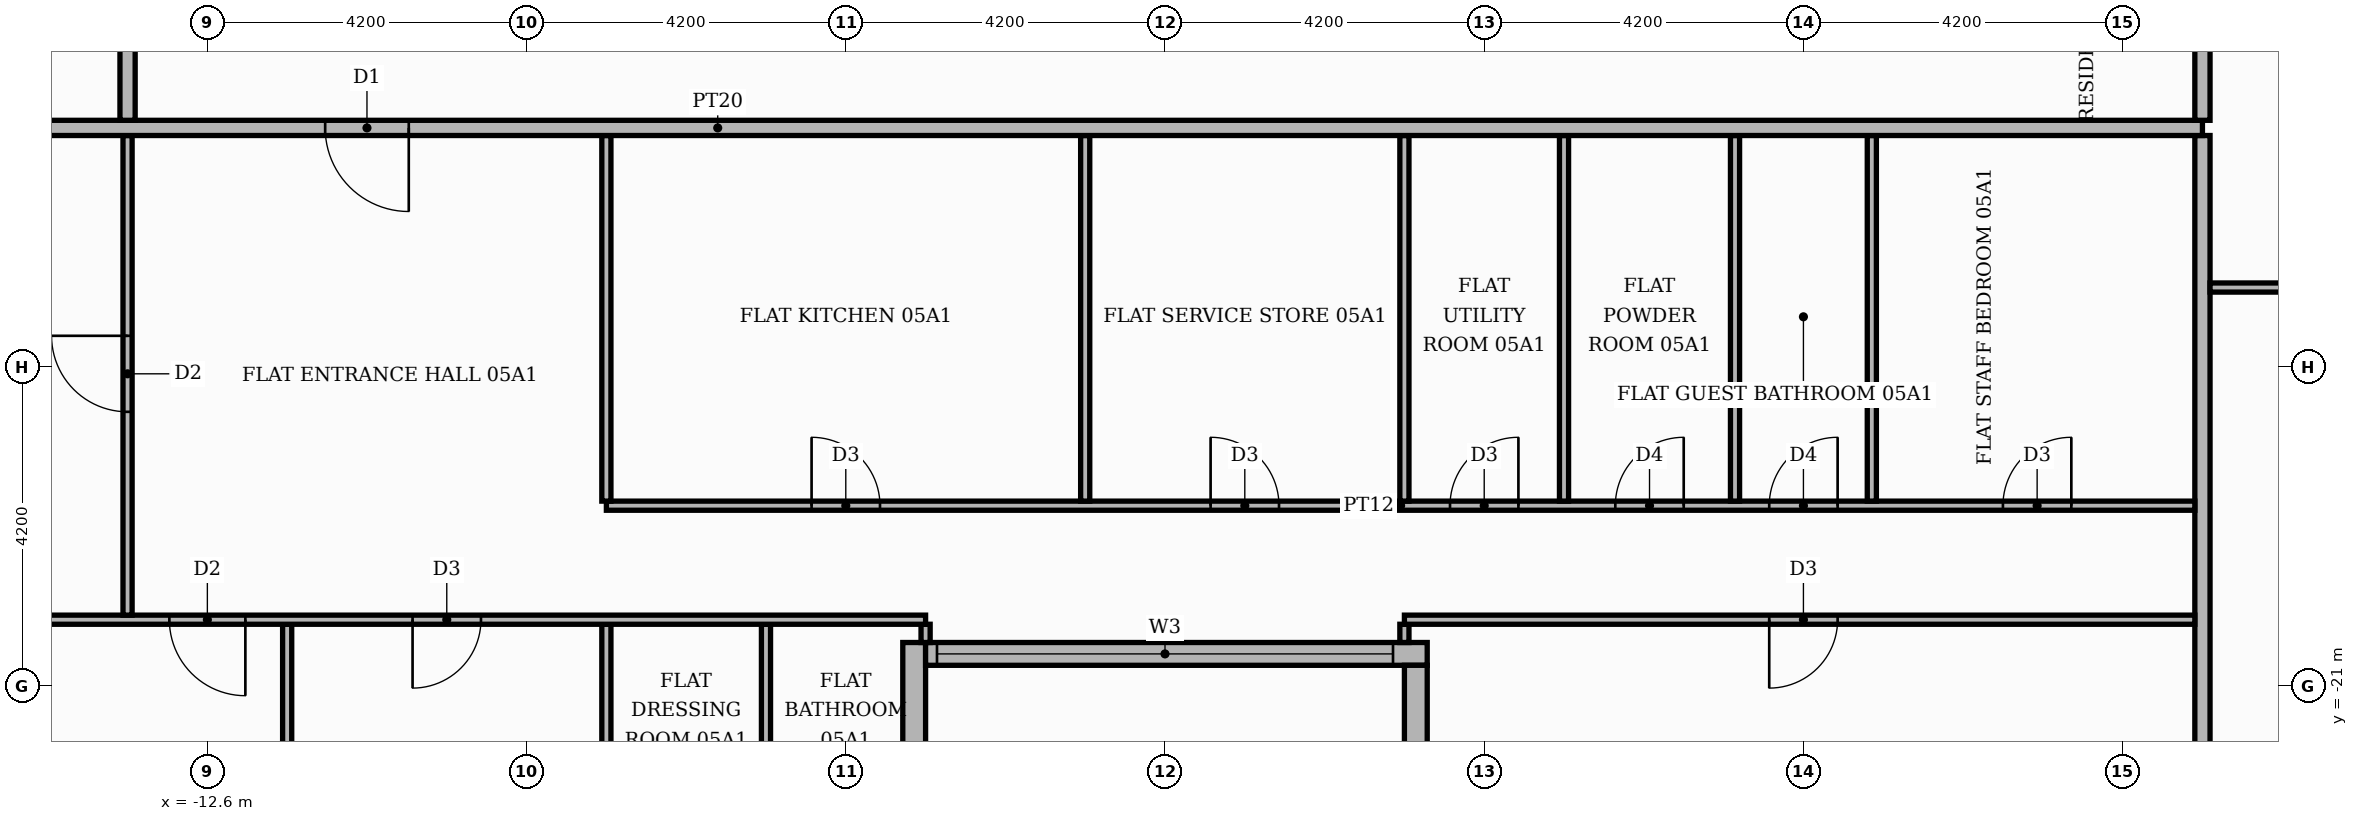
"""IFC4 building model, lengths in metres.
Left out: names, types, materials, properties, quantities, classifications, styles, units other than length and angle.
Written with IfcOpenShell. Run it as: python <this file> out.ifc"""

import sys

from ifc_helpers import new_model, si_unit, direction, frame, frame_2d, origin, place, context, subcontext, project, spatial, rectangle, extrude, element, fill, save


model = new_model("IFC4")
c1 = context("Model", 3, precision=1e-05, world=origin(), true_north=direction((0.0, 1.0)))
c2 = subcontext(c1, "Body", "Model", "MODEL_VIEW")
j1 = project(units=[si_unit("LENGTHUNIT", "METRE"), si_unit("PLANEANGLEUNIT", "RADIAN")], contexts=[c1])
p1 = place(None, origin())
s1 = spatial("IfcSite", under=j1, at=p1, CompositionType="ELEMENT")
p2 = place(p1, origin())
s2 = spatial("IfcBuilding", under=s1, at=p2, CompositionType="ELEMENT")
p3 = place(p2, frame((0.0, 0.0, 27.0)))
s3 = spatial("IfcBuildingStorey", under=s2, at=p3, CompositionType="ELEMENT", Elevation=27.0)
p4 = place(p3, frame((-3.3, -25.42, 0.0), z_axis=(0.0, 0.0, 1.0), x_axis=(0.0, 1.0, 0.0)))
e1 = element("IfcWall", 1, at=p4, inside=s3, PredefinedType="STANDARD", context=c2, shape_type="SweptSolid", body=[
    extrude(rectangle(XDim=5.0, YDim=0.3, at=frame_2d((2.5, 0.0))), origin(), (0.0, 0.0, 1.0), 3.48),
])
p5 = place(p4, frame((1.42, 0.0, 0.9)))
e2 = element("IfcOpeningElement", 2, at=p5, cuts=e1, PredefinedType="OPENING", context=c2, shape_type="SweptSolid", body=[
    extrude(rectangle(XDim=1.8, YDim=2.1, at=frame_2d((0.9, 1.05))), frame((0.0, 0.16, 0.0), z_axis=(0.0, -1.0, 0.0), x_axis=(1.0, 0.0, 0.0)), (0.0, 0.0, 1.0), 0.32),
])
p6 = place(p3, frame((-3.15, -20.57, 0.0), z_axis=(0.0, 0.0, 1.0), x_axis=(1.0, 0.0, 0.0)))
e3 = element("IfcWall", 3, at=p6, inside=s3, PredefinedType="STANDARD", context=c2, shape_type="SweptSolid", body=[
    extrude(rectangle(XDim=6.6, YDim=0.3, at=frame_2d((3.3, 0.0))), origin(), (0.0, 0.0, 1.0), 3.48),
])
p7 = place(p6, frame((0.15, 0.0, 0.9)))
e4 = element("IfcOpeningElement", 4, at=p7, cuts=e3, PredefinedType="OPENING", context=c2, shape_type="SweptSolid", body=[
    extrude(rectangle(XDim=6.0, YDim=2.1, at=frame_2d((3.0, 1.05))), frame((0.0, 0.16, 0.0), z_axis=(0.0, -1.0, 0.0), x_axis=(1.0, 0.0, 0.0)), (0.0, 0.0, 1.0), 0.32),
])
p8 = place(p3, frame((3.3, -20.72, 0.0), z_axis=(0.0, 0.0, 1.0), x_axis=(0.0, -1.0, 0.0)))
e5 = element("IfcWall", 5, at=p8, inside=s3, PredefinedType="STANDARD", context=c2, shape_type="SweptSolid", body=[
    extrude(rectangle(XDim=5.0, YDim=0.3, at=frame_2d((2.5, 0.0))), origin(), (0.0, 0.0, 1.0), 3.48),
])
p9 = place(p8, frame((1.48, 0.0, 0.9)))
e6 = element("IfcOpeningElement", 6, at=p9, cuts=e5, PredefinedType="OPENING", context=c2, shape_type="SweptSolid", body=[
    extrude(rectangle(XDim=1.8, YDim=2.1, at=frame_2d((0.9, 1.05))), frame((0.0, 0.16, 0.0), z_axis=(0.0, -1.0, 0.0), x_axis=(1.0, 0.0, 0.0)), (0.0, 0.0, 1.0), 0.32),
])
p10 = place(p3, frame((-11.55, -25.42, 0.0), z_axis=(0.0, 0.0, 1.0), x_axis=(0.0, 1.0, 0.0)))
e7 = element("IfcWall", 7, at=p10, inside=s3, PredefinedType="PARTITIONING", context=c2, shape_type="SweptSolid", body=[
    extrude(rectangle(XDim=5.24, YDim=0.12, at=frame_2d((2.62, 0.0))), origin(), (0.0, 0.0, 1.0), 3.48),
])
p11 = place(p3, frame((-7.35, -25.42, 0.0), z_axis=(0.0, 0.0, 1.0), x_axis=(0.0, 1.0, 0.0)))
e8 = element("IfcWall", 8, at=p11, inside=s3, PredefinedType="PARTITIONING", context=c2, shape_type="SweptSolid", body=[
    extrude(rectangle(XDim=5.24, YDim=0.12, at=frame_2d((2.62, 0.0))), origin(), (0.0, 0.0, 1.0), 3.48),
])
p12 = place(p11, frame((2.05, 0.0, 0.0)))
e9 = element("IfcOpeningElement", 9, at=p12, cuts=e8, PredefinedType="OPENING", context=c2, shape_type="SweptSolid", body=[
    extrude(rectangle(XDim=0.9, YDim=2.1, at=frame_2d((0.45, 1.05))), frame((0.0, 0.07, 0.0), z_axis=(0.0, -1.0, 0.0), x_axis=(1.0, 0.0, 0.0)), (0.0, 0.0, 1.0), 0.14),
])
p13 = place(p3, frame((-5.25, -25.42, 0.0), z_axis=(0.0, 0.0, 1.0), x_axis=(0.0, 1.0, 0.0)))
e10 = element("IfcWall", 10, at=p13, inside=s3, PredefinedType="PARTITIONING", context=c2, shape_type="SweptSolid", body=[
    extrude(rectangle(XDim=5.24, YDim=0.12, at=frame_2d((2.62, 0.0))), origin(), (0.0, 0.0, 1.0), 3.48),
])
p14 = place(p13, frame((2.05, 0.0, 0.0)))
e11 = element("IfcOpeningElement", 11, at=p14, cuts=e10, PredefinedType="OPENING", context=c2, shape_type="SweptSolid", body=[
    extrude(rectangle(XDim=0.9, YDim=2.1, at=frame_2d((0.45, 1.05))), frame((0.0, 0.07, 0.0), z_axis=(0.0, -1.0, 0.0), x_axis=(1.0, 0.0, 0.0)), (0.0, 0.0, 1.0), 0.14),
])
p15 = place(p3, frame((13.65, -25.42, 0.0), z_axis=(0.0, 0.0, 1.0), x_axis=(0.0, 1.0, 0.0)))
e12 = element("IfcWall", 12, at=p15, inside=s3, PredefinedType="PARTITIONING", context=c2, shape_type="SweptSolid", body=[
    extrude(rectangle(XDim=11.67, YDim=0.2, at=frame_2d((5.835, 0.0))), origin(), (0.0, 0.0, 1.0), 3.48),
])
for number, where, z_axis, x_axis in (
    (13, (-3.15, -20.42, 0.0), (0.0, 0.0, 1.0), (0.0, 1.0, 0.0)),
    (14, (3.15, -20.42, 0.0), (0.0, 0.0, 1.0), (0.0, 1.0, 0.0)),
):
    element("IfcWall", number, at=place(p3, frame(where, z_axis=z_axis, x_axis=x_axis)), inside=s3, PredefinedType="PARTITIONING", context=c2, shape_type="SweptSolid", body=[
        extrude(rectangle(XDim=0.24, YDim=0.12, at=frame_2d((0.12, 0.0))), origin(), (0.0, 0.0, 1.0), 3.48),
    ])
p16 = place(p3, frame((-17.3, -20.12, 0.0), z_axis=(0.0, 0.0, 1.0), x_axis=(1.0, 0.0, 0.0)))
e15 = element("IfcWall", 15, at=p16, inside=s3, PredefinedType="PARTITIONING", context=c2, shape_type="SweptSolid", body=[
    extrude(rectangle(XDim=14.15, YDim=0.12, at=frame_2d((7.075, 0.0))), origin(), (0.0, 0.0, 1.0), 3.48),
])
p17 = place(p16, frame((4.2, 0.0, 0.0)))
e16 = element("IfcOpeningElement", 16, at=p17, cuts=e15, PredefinedType="OPENING", context=c2, shape_type="SweptSolid", body=[
    extrude(rectangle(XDim=1.0, YDim=2.1, at=frame_2d((0.5, 1.05))), frame((0.0, 0.07, 0.0), z_axis=(0.0, -1.0, 0.0), x_axis=(1.0, 0.0, 0.0)), (0.0, 0.0, 1.0), 0.14),
])
p18 = place(p16, frame((7.4, 0.0, 0.0)))
e17 = element("IfcOpeningElement", 17, at=p18, cuts=e15, PredefinedType="OPENING", context=c2, shape_type="SweptSolid", body=[
    extrude(rectangle(XDim=0.9, YDim=2.1, at=frame_2d((0.45, 1.05))), frame((0.0, 0.07, 0.0), z_axis=(0.0, -1.0, 0.0), x_axis=(1.0, 0.0, 0.0)), (0.0, 0.0, 1.0), 0.14),
])
p19 = place(p3, frame((3.15, -20.12, 0.0), z_axis=(0.0, 0.0, 1.0), x_axis=(1.0, 0.0, 0.0)))
e18 = element("IfcWall", 18, at=p19, inside=s3, PredefinedType="PARTITIONING", context=c2, shape_type="SweptSolid", body=[
    extrude(rectangle(XDim=10.4, YDim=0.12, at=frame_2d((5.2, 0.0))), origin(), (0.0, 0.0, 1.0), 3.48),
])
p20 = place(p19, frame((4.8, 0.0, 0.0)))
e19 = element("IfcOpeningElement", 19, at=p20, cuts=e18, PredefinedType="OPENING", context=c2, shape_type="SweptSolid", body=[
    extrude(rectangle(XDim=0.9, YDim=2.1, at=frame_2d((0.45, 1.05))), frame((0.0, 0.07, 0.0), z_axis=(0.0, -1.0, 0.0), x_axis=(1.0, 0.0, 0.0)), (0.0, 0.0, 1.0), 0.14),
])
p21 = place(p3, frame((-13.65, -20.06, 0.0), z_axis=(0.0, 0.0, 1.0), x_axis=(0.0, 1.0, 0.0)))
e20 = element("IfcWall", 20, at=p21, inside=s3, PredefinedType="PARTITIONING", context=c2, shape_type="SweptSolid", body=[
    extrude(rectangle(XDim=6.31, YDim=0.12, at=frame_2d((3.155, 0.0))), origin(), (0.0, 0.0, 1.0), 3.48),
])
p22 = place(p21, frame((2.675, 0.0, 0.0)))
e21 = element("IfcOpeningElement", 21, at=p22, cuts=e20, PredefinedType="OPENING", context=c2, shape_type="SweptSolid", body=[
    extrude(rectangle(XDim=1.0, YDim=2.1, at=frame_2d((0.5, 1.05))), frame((0.0, 0.07, 0.0), z_axis=(0.0, -1.0, 0.0), x_axis=(1.0, 0.0, 0.0)), (0.0, 0.0, 1.0), 0.14),
])
p23 = place(p3, frame((-7.35, -18.62, 0.0), z_axis=(0.0, 0.0, 1.0), x_axis=(1.0, 0.0, 0.0)))
e22 = element("IfcWall", 22, at=p23, inside=s3, PredefinedType="PARTITIONING", context=c2, shape_type="SweptSolid", body=[
    extrude(rectangle(XDim=20.9, YDim=0.12, at=frame_2d((10.45, 0.0))), origin(), (0.0, 0.0, 1.0), 3.48),
])
p24 = place(p23, frame((2.7, 0.0, 0.0)))
e23 = element("IfcOpeningElement", 23, at=p24, cuts=e22, PredefinedType="OPENING", context=c2, shape_type="SweptSolid", body=[
    extrude(rectangle(XDim=0.9, YDim=2.1, at=frame_2d((0.45, 1.05))), frame((0.0, 0.07, 0.0), z_axis=(0.0, -1.0, 0.0), x_axis=(1.0, 0.0, 0.0)), (0.0, 0.0, 1.0), 0.14),
])
p25 = place(p23, frame((7.95, 0.0, 0.0)))
e24 = element("IfcOpeningElement", 24, at=p25, cuts=e22, PredefinedType="OPENING", context=c2, shape_type="SweptSolid", body=[
    extrude(rectangle(XDim=0.9, YDim=2.1, at=frame_2d((0.45, 1.05))), frame((0.0, 0.07, 0.0), z_axis=(0.0, -1.0, 0.0), x_axis=(1.0, 0.0, 0.0)), (0.0, 0.0, 1.0), 0.14),
])
p26 = place(p23, frame((11.1, 0.0, 0.0)))
e25 = element("IfcOpeningElement", 25, at=p26, cuts=e22, PredefinedType="OPENING", context=c2, shape_type="SweptSolid", body=[
    extrude(rectangle(XDim=0.9, YDim=2.1, at=frame_2d((0.45, 1.05))), frame((0.0, 0.07, 0.0), z_axis=(0.0, -1.0, 0.0), x_axis=(1.0, 0.0, 0.0)), (0.0, 0.0, 1.0), 0.14),
])
p27 = place(p23, frame((13.275, 0.0, 0.0)))
e26 = element("IfcOpeningElement", 26, at=p27, cuts=e22, PredefinedType="OPENING", context=c2, shape_type="SweptSolid", body=[
    extrude(rectangle(XDim=0.9, YDim=2.1, at=frame_2d((0.45, 1.05))), frame((0.0, 0.07, 0.0), z_axis=(0.0, -1.0, 0.0), x_axis=(1.0, 0.0, 0.0)), (0.0, 0.0, 1.0), 0.14),
])
p28 = place(p23, frame((15.3, 0.0, 0.0)))
e27 = element("IfcOpeningElement", 27, at=p28, cuts=e22, PredefinedType="OPENING", context=c2, shape_type="SweptSolid", body=[
    extrude(rectangle(XDim=0.9, YDim=2.1, at=frame_2d((0.45, 1.05))), frame((0.0, 0.07, 0.0), z_axis=(0.0, -1.0, 0.0), x_axis=(1.0, 0.0, 0.0)), (0.0, 0.0, 1.0), 0.14),
])
p29 = place(p23, frame((18.375, 0.0, 0.0)))
e28 = element("IfcOpeningElement", 28, at=p29, cuts=e22, PredefinedType="OPENING", context=c2, shape_type="SweptSolid", body=[
    extrude(rectangle(XDim=0.9, YDim=2.1, at=frame_2d((0.45, 1.05))), frame((0.0, 0.07, 0.0), z_axis=(0.0, -1.0, 0.0), x_axis=(1.0, 0.0, 0.0)), (0.0, 0.0, 1.0), 0.14),
])
for number, where, z_axis, x_axis in (
    (29, (-7.35, -18.56, 0.0), (0.0, 0.0, 1.0), (0.0, 1.0, 0.0)),
    (30, (-1.05, -18.56, 0.0), (0.0, 0.0, 1.0), (0.0, 1.0, 0.0)),
    (31, (3.15, -18.56, 0.0), (0.0, 0.0, 1.0), (0.0, 1.0, 0.0)),
    (32, (5.25, -18.56, 0.0), (0.0, 0.0, 1.0), (0.0, 1.0, 0.0)),
    (33, (7.5, -18.56, 0.0), (0.0, 0.0, 1.0), (0.0, 1.0, 0.0)),
    (34, (9.3, -18.56, 0.0), (0.0, 0.0, 1.0), (0.0, 1.0, 0.0)),
):
    element("IfcWall", number, at=place(p3, frame(where, z_axis=z_axis, x_axis=x_axis)), inside=s3, PredefinedType="PARTITIONING", context=c2, shape_type="SweptSolid", body=[
        extrude(rectangle(XDim=4.81, YDim=0.12, at=frame_2d((2.405, 0.0))), origin(), (0.0, 0.0, 1.0), 3.48),
    ])
p30 = place(p3, frame((13.75, -15.75, 0.0), z_axis=(0.0, 0.0, 1.0), x_axis=(1.0, 0.0, 0.0)))
e35 = element("IfcWall", 35, at=p30, inside=s3, PredefinedType="PARTITIONING", context=c2, shape_type="SweptSolid", body=[
    extrude(rectangle(XDim=6.37, YDim=0.12, at=frame_2d((3.185, 0.0))), origin(), (0.0, 0.0, 1.0), 3.48),
])
p31 = place(p30, frame((2.635, 0.0, 0.0)))
e36 = element("IfcOpeningElement", 36, at=p31, cuts=e35, PredefinedType="OPENING", context=c2, shape_type="SweptSolid", body=[
    extrude(rectangle(XDim=1.0, YDim=2.1, at=frame_2d((0.5, 1.05))), frame((0.0, 0.07, 0.0), z_axis=(0.0, -1.0, 0.0), x_axis=(1.0, 0.0, 0.0)), (0.0, 0.0, 1.0), 0.14),
])
p32 = place(p3, frame((-25.42, -13.65, 0.0), z_axis=(0.0, 0.0, 1.0), x_axis=(1.0, 0.0, 0.0)))
e37 = element("IfcWall", 37, at=p32, inside=s3, PredefinedType="PARTITIONING", context=c2, shape_type="SweptSolid", body=[
    extrude(rectangle(XDim=39.07, YDim=0.2, at=frame_2d((19.535, 0.0))), origin(), (0.0, 0.0, 1.0), 3.48),
])
p33 = place(p32, frame((14.37, 0.0, 0.0)))
e38 = element("IfcOpeningElement", 38, at=p33, cuts=e37, PredefinedType="OPENING", context=c2, shape_type="SweptSolid", body=[
    extrude(rectangle(XDim=1.1, YDim=2.4, at=frame_2d((0.55, 1.2))), frame((0.0, 0.11, 0.0), z_axis=(0.0, -1.0, 0.0), x_axis=(1.0, 0.0, 0.0)), (0.0, 0.0, 1.0), 0.22),
])
p34 = place(p3, frame((-13.65, -13.55, 0.0), z_axis=(0.0, 0.0, 1.0), x_axis=(0.0, 1.0, 0.0)))
e39 = element("IfcWall", 39, at=p34, inside=s3, PredefinedType="PARTITIONING", context=c2, shape_type="SweptSolid", body=[
    extrude(rectangle(XDim=27.1, YDim=0.2, at=frame_2d((13.55, 0.0))), origin(), (0.0, 0.0, 1.0), 3.48),
])
p35 = place(p34, frame((24.55, 0.0, 0.0)))
e40 = element("IfcOpeningElement", 40, at=p35, cuts=e39, PredefinedType="OPENING", context=c2, shape_type="SweptSolid", body=[
    extrude(rectangle(XDim=1.1, YDim=2.4, at=frame_2d((0.55, 1.2))), frame((0.0, 0.11, 0.0), z_axis=(0.0, -1.0, 0.0), x_axis=(1.0, 0.0, 0.0)), (0.0, 0.0, 1.0), 0.22),
])
p36 = place(p3, frame((13.65, -13.55, 0.0), z_axis=(0.0, 0.0, 1.0), x_axis=(0.0, 1.0, 0.0)))
e41 = element("IfcWall", 41, at=p36, inside=s3, PredefinedType="PARTITIONING", context=c2, shape_type="SweptSolid", body=[
    extrude(rectangle(XDim=8.2, YDim=0.2, at=frame_2d((4.1, 0.0))), origin(), (0.0, 0.0, 1.0), 3.48),
])
p37 = place(p36, frame((1.45, 0.0, 0.0)))
e42 = element("IfcOpeningElement", 42, at=p37, cuts=e41, PredefinedType="OPENING", context=c2, shape_type="SweptSolid", body=[
    extrude(rectangle(XDim=1.1, YDim=2.4, at=frame_2d((0.55, 1.2))), frame((0.0, 0.11, 0.0), z_axis=(0.0, -1.0, 0.0), x_axis=(1.0, 0.0, 0.0)), (0.0, 0.0, 1.0), 0.22),
])
p38 = place(p7, origin())
e43 = element("IfcWindow", 43, at=p38, inside=s3, PartitioningType="SINGLE_PANEL", PredefinedType="WINDOW", context=c2, shape_type="SweptSolid", body=[
    extrude(rectangle(XDim=6.0, YDim=2.1, at=frame_2d((3.0, 1.05))), frame((0.0, 0.03, 0.0), z_axis=(0.0, -1.0, 0.0), x_axis=(1.0, 0.0, 0.0)), (0.0, 0.0, 1.0), 0.06),
])
fill(e4, e43)
p39 = place(p33, frame((1.1, 0.0, 0.0), z_axis=(0.0, 0.0, 1.0), x_axis=(-1.0, 0.0, 0.0)))
e44 = element("IfcDoor", 44, at=p39, inside=s3, OperationType="SINGLE_SWING_RIGHT", PredefinedType="DOOR", context=c2, shape_type="SweptSolid", body=[
    extrude(rectangle(XDim=1.1, YDim=2.4, at=frame_2d((0.55, 1.2))), frame((0.0, 0.025, 0.0), z_axis=(0.0, -1.0, 0.0), x_axis=(1.0, 0.0, 0.0)), (0.0, 0.0, 1.0), 0.05),
])
fill(e38, e44)
p40 = place(p22, origin())
e45 = element("IfcDoor", 45, at=p40, inside=s3, OperationType="SINGLE_SWING_RIGHT", PredefinedType="DOOR", context=c2, shape_type="SweptSolid", body=[
    extrude(rectangle(XDim=1.0, YDim=2.1, at=frame_2d((0.5, 1.05))), frame((0.0, 0.025, 0.0), z_axis=(0.0, -1.0, 0.0), x_axis=(1.0, 0.0, 0.0)), (0.0, 0.0, 1.0), 0.05),
])
fill(e21, e45)
p41 = place(p24, origin())
e46 = element("IfcDoor", 46, at=p41, inside=s3, OperationType="SINGLE_SWING_LEFT", PredefinedType="DOOR", context=c2, shape_type="SweptSolid", body=[
    extrude(rectangle(XDim=0.9, YDim=2.1, at=frame_2d((0.45, 1.05))), frame((0.0, 0.025, 0.0), z_axis=(0.0, -1.0, 0.0), x_axis=(1.0, 0.0, 0.0)), (0.0, 0.0, 1.0), 0.05),
])
fill(e23, e46)
p42 = place(p25, origin())
e47 = element("IfcDoor", 47, at=p42, inside=s3, OperationType="SINGLE_SWING_LEFT", PredefinedType="DOOR", context=c2, shape_type="SweptSolid", body=[
    extrude(rectangle(XDim=0.9, YDim=2.1, at=frame_2d((0.45, 1.05))), frame((0.0, 0.025, 0.0), z_axis=(0.0, -1.0, 0.0), x_axis=(1.0, 0.0, 0.0)), (0.0, 0.0, 1.0), 0.05),
])
fill(e24, e47)
p43 = place(p26, origin())
e48 = element("IfcDoor", 48, at=p43, inside=s3, OperationType="SINGLE_SWING_RIGHT", PredefinedType="DOOR", context=c2, shape_type="SweptSolid", body=[
    extrude(rectangle(XDim=0.9, YDim=2.1, at=frame_2d((0.45, 1.05))), frame((0.0, 0.025, 0.0), z_axis=(0.0, -1.0, 0.0), x_axis=(1.0, 0.0, 0.0)), (0.0, 0.0, 1.0), 0.05),
])
fill(e25, e48)
p44 = place(p27, origin())
e49 = element("IfcDoor", 49, at=p44, inside=s3, OperationType="SINGLE_SWING_RIGHT", PredefinedType="DOOR", context=c2, shape_type="SweptSolid", body=[
    extrude(rectangle(XDim=0.9, YDim=2.1, at=frame_2d((0.45, 1.05))), frame((0.0, 0.025, 0.0), z_axis=(0.0, -1.0, 0.0), x_axis=(1.0, 0.0, 0.0)), (0.0, 0.0, 1.0), 0.05),
])
fill(e26, e49)
p45 = place(p28, origin())
e50 = element("IfcDoor", 50, at=p45, inside=s3, OperationType="SINGLE_SWING_RIGHT", PredefinedType="DOOR", context=c2, shape_type="SweptSolid", body=[
    extrude(rectangle(XDim=0.9, YDim=2.1, at=frame_2d((0.45, 1.05))), frame((0.0, 0.025, 0.0), z_axis=(0.0, -1.0, 0.0), x_axis=(1.0, 0.0, 0.0)), (0.0, 0.0, 1.0), 0.05),
])
fill(e27, e50)
p46 = place(p29, origin())
e51 = element("IfcDoor", 51, at=p46, inside=s3, OperationType="SINGLE_SWING_RIGHT", PredefinedType="DOOR", context=c2, shape_type="SweptSolid", body=[
    extrude(rectangle(XDim=0.9, YDim=2.1, at=frame_2d((0.45, 1.05))), frame((0.0, 0.025, 0.0), z_axis=(0.0, -1.0, 0.0), x_axis=(1.0, 0.0, 0.0)), (0.0, 0.0, 1.0), 0.05),
])
fill(e28, e51)
p47 = place(p17, frame((1.0, 0.0, 0.0), z_axis=(0.0, 0.0, 1.0), x_axis=(-1.0, 0.0, 0.0)))
e52 = element("IfcDoor", 52, at=p47, inside=s3, OperationType="SINGLE_SWING_RIGHT", PredefinedType="DOOR", context=c2, shape_type="SweptSolid", body=[
    extrude(rectangle(XDim=1.0, YDim=2.1, at=frame_2d((0.5, 1.05))), frame((0.0, 0.025, 0.0), z_axis=(0.0, -1.0, 0.0), x_axis=(1.0, 0.0, 0.0)), (0.0, 0.0, 1.0), 0.05),
])
fill(e16, e52)
p48 = place(p18, frame((0.9, 0.0, 0.0), z_axis=(0.0, 0.0, 1.0), x_axis=(-1.0, 0.0, 0.0)))
e53 = element("IfcDoor", 53, at=p48, inside=s3, OperationType="SINGLE_SWING_LEFT", PredefinedType="DOOR", context=c2, shape_type="SweptSolid", body=[
    extrude(rectangle(XDim=0.9, YDim=2.1, at=frame_2d((0.45, 1.05))), frame((0.0, 0.025, 0.0), z_axis=(0.0, -1.0, 0.0), x_axis=(1.0, 0.0, 0.0)), (0.0, 0.0, 1.0), 0.05),
])
fill(e17, e53)
p49 = place(p20, frame((0.9, 0.0, 0.0), z_axis=(0.0, 0.0, 1.0), x_axis=(-1.0, 0.0, 0.0)))
e54 = element("IfcDoor", 54, at=p49, inside=s3, OperationType="SINGLE_SWING_LEFT", PredefinedType="DOOR", context=c2, shape_type="SweptSolid", body=[
    extrude(rectangle(XDim=0.9, YDim=2.1, at=frame_2d((0.45, 1.05))), frame((0.0, 0.025, 0.0), z_axis=(0.0, -1.0, 0.0), x_axis=(1.0, 0.0, 0.0)), (0.0, 0.0, 1.0), 0.05),
])
fill(e19, e54)
save(model, sys.argv[1])
